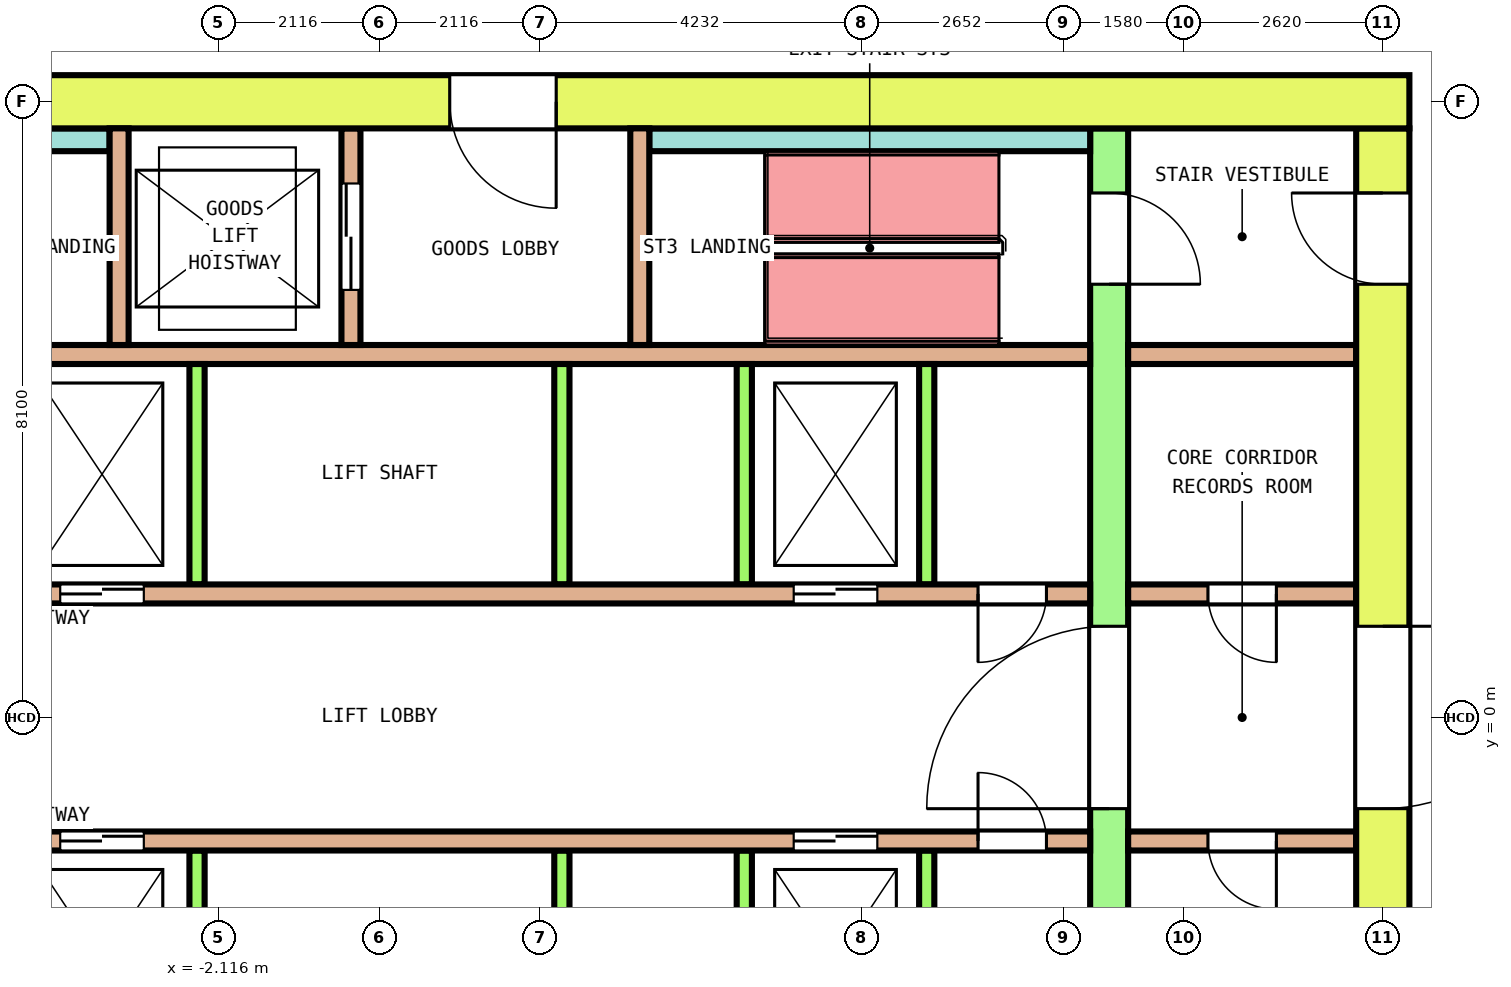
"""IFC4 building model, lengths in metres.
Left out: names, types, materials, properties, quantities, classifications, styles, units other than length and angle.
Written with IfcOpenShell. Run it as: python <this file> out.ifc"""

import sys

from ifc_helpers import new_model, si_unit, direction, frame, frame_2d, origin, place, context, subcontext, project, spatial, rectangle, extrude, element, fill, save


model = new_model("IFC4")
c1 = context("Model", 3, precision=1e-05, world=origin(), true_north=direction((0.0, 1.0)))
c2 = subcontext(c1, "Body", "Model", "MODEL_VIEW")
j1 = project(units=[si_unit("LENGTHUNIT", "METRE"), si_unit("PLANEANGLEUNIT", "RADIAN")], contexts=[c1])
p1 = place(None, origin())
s1 = spatial("IfcSite", under=j1, at=p1, CompositionType="ELEMENT")
p2 = place(p1, origin())
s2 = spatial("IfcBuilding", under=s1, at=p2, CompositionType="ELEMENT")
p3 = place(p2, frame((0.0, 0.0, 171.6)))
s3 = spatial("IfcBuildingStorey", under=s2, at=p3, CompositionType="ELEMENT", Elevation=171.6)
p4 = place(p3, frame((-13.55, 8.1, 0.0), z_axis=(0.0, 0.0, 1.0), x_axis=(1.0, 0.0, 0.0)))
e1 = element("IfcWall", 1, at=p4, inside=s3, PredefinedType="SHEAR", context=c2, shape_type="SweptSolid", body=[
    extrude(rectangle(XDim=27.1, YDim=0.7, at=frame_2d((13.55, 0.0))), origin(), (0.0, 0.0, 1.0), 4.1),
])
p5 = place(p4, frame((14.475, 0.0, 0.0)))
e2 = element("IfcOpeningElement", 2, at=p5, cuts=e1, PredefinedType="OPENING", context=c2, shape_type="SweptSolid", body=[
    extrude(rectangle(XDim=1.4, YDim=2.1, at=frame_2d((0.7, 1.05))), frame((0.0, 0.36, 0.0), z_axis=(0.0, -1.0, 0.0), x_axis=(1.0, 0.0, 0.0)), (0.0, 0.0, 1.0), 0.72),
])
p6 = place(p3, frame((13.2, -7.75, 0.0), z_axis=(0.0, 0.0, 1.0), x_axis=(0.0, 1.0, 0.0)))
e3 = element("IfcWall", 3, at=p6, inside=s3, PredefinedType="SHEAR", context=c2, shape_type="SweptSolid", body=[
    extrude(rectangle(XDim=15.5, YDim=0.7, at=frame_2d((7.75, 0.0))), origin(), (0.0, 0.0, 1.0), 4.1),
])
p7 = place(p6, frame((6.55, 0.0, 0.0)))
e4 = element("IfcOpeningElement", 4, at=p7, cuts=e3, PredefinedType="OPENING", context=c2, shape_type="SweptSolid", body=[
    extrude(rectangle(XDim=2.4, YDim=2.1, at=frame_2d((1.2, 1.05))), frame((0.0, 0.36, 0.0), z_axis=(0.0, -1.0, 0.0), x_axis=(1.0, 0.0, 0.0)), (0.0, 0.0, 1.0), 0.72),
])
p8 = place(p6, frame((13.45, 0.0, 0.0)))
e5 = element("IfcOpeningElement", 5, at=p8, cuts=e3, PredefinedType="OPENING", context=c2, shape_type="SweptSolid", body=[
    extrude(rectangle(XDim=1.2, YDim=2.1, at=frame_2d((0.6, 1.05))), frame((0.0, 0.36, 0.0), z_axis=(0.0, -1.0, 0.0), x_axis=(1.0, 0.0, 0.0)), (0.0, 0.0, 1.0), 0.72),
])
p9 = place(p6, frame((0.95, 0.0, 0.0)))
e6 = element("IfcOpeningElement", 6, at=p9, cuts=e3, PredefinedType="OPENING", context=c2, shape_type="SweptSolid", body=[
    extrude(rectangle(XDim=1.0, YDim=2.1, at=frame_2d((0.5, 1.05))), frame((0.0, 0.36, 0.0), z_axis=(0.0, -1.0, 0.0), x_axis=(1.0, 0.0, 0.0)), (0.0, 0.0, 1.0), 0.72),
])
p10 = place(p3, frame((9.6, -7.75, 0.0), z_axis=(0.0, 0.0, 1.0), x_axis=(0.0, 1.0, 0.0)))
e7 = element("IfcWall", 7, at=p10, inside=s3, PredefinedType="SHEAR", context=c2, shape_type="SweptSolid", body=[
    extrude(rectangle(XDim=15.5, YDim=0.5, at=frame_2d((7.75, 0.0))), origin(), (0.0, 0.0, 1.0), 4.1),
])
p11 = place(p10, frame((6.55, 0.0, 0.0)))
e8 = element("IfcOpeningElement", 8, at=p11, cuts=e7, PredefinedType="OPENING", context=c2, shape_type="SweptSolid", body=[
    extrude(rectangle(XDim=2.4, YDim=2.1, at=frame_2d((1.2, 1.05))), frame((0.0, 0.26, 0.0), z_axis=(0.0, -1.0, 0.0), x_axis=(1.0, 0.0, 0.0)), (0.0, 0.0, 1.0), 0.52),
])
p12 = place(p10, frame((13.45, 0.0, 0.0)))
e9 = element("IfcOpeningElement", 9, at=p12, cuts=e7, PredefinedType="OPENING", context=c2, shape_type="SweptSolid", body=[
    extrude(rectangle(XDim=1.2, YDim=2.1, at=frame_2d((0.6, 1.05))), frame((0.0, 0.26, 0.0), z_axis=(0.0, -1.0, 0.0), x_axis=(1.0, 0.0, 0.0)), (0.0, 0.0, 1.0), 0.52),
])
p13 = place(p10, frame((0.95, 0.0, 0.0)))
e10 = element("IfcOpeningElement", 10, at=p13, cuts=e7, PredefinedType="OPENING", context=c2, shape_type="SweptSolid", body=[
    extrude(rectangle(XDim=1.0, YDim=2.1, at=frame_2d((0.5, 1.05))), frame((0.0, 0.26, 0.0), z_axis=(0.0, -1.0, 0.0), x_axis=(1.0, 0.0, 0.0)), (0.0, 0.0, 1.0), 0.52),
])
p14 = place(p3, frame((-9.35, 1.625, 0.0), z_axis=(0.0, 0.0, 1.0), x_axis=(1.0, 0.0, 0.0)))
e11 = element("IfcWall", 11, at=p14, inside=s3, PredefinedType="SOLIDWALL", context=c2, shape_type="SweptSolid", body=[
    extrude(rectangle(XDim=18.7, YDim=0.25, at=frame_2d((9.35, 0.0))), origin(), (0.0, 0.0, 1.0), 4.1),
])
p15 = place(p14, frame((2.85, 0.0, 0.0)))
e12 = element("IfcOpeningElement", 12, at=p15, cuts=e11, PredefinedType="OPENING", context=c2, shape_type="SweptSolid", body=[
    extrude(rectangle(XDim=1.1, YDim=2.1, at=frame_2d((0.55, 1.05))), frame((0.0, 0.135, 0.0), z_axis=(0.0, -1.0, 0.0), x_axis=(1.0, 0.0, 0.0)), (0.0, 0.0, 1.0), 0.27),
])
p16 = place(p14, frame((5.15, 0.0, 0.0)))
e13 = element("IfcOpeningElement", 13, at=p16, cuts=e11, PredefinedType="OPENING", context=c2, shape_type="SweptSolid", body=[
    extrude(rectangle(XDim=1.1, YDim=2.1, at=frame_2d((0.55, 1.05))), frame((0.0, 0.135, 0.0), z_axis=(0.0, -1.0, 0.0), x_axis=(1.0, 0.0, 0.0)), (0.0, 0.0, 1.0), 0.27),
])
p17 = place(p14, frame((14.8, 0.0, 0.0)))
e14 = element("IfcOpeningElement", 14, at=p17, cuts=e11, PredefinedType="OPENING", context=c2, shape_type="SweptSolid", body=[
    extrude(rectangle(XDim=1.1, YDim=2.1, at=frame_2d((0.55, 1.05))), frame((0.0, 0.135, 0.0), z_axis=(0.0, -1.0, 0.0), x_axis=(1.0, 0.0, 0.0)), (0.0, 0.0, 1.0), 0.27),
])
p18 = place(p14, frame((0.575, 0.0, 0.0)))
e15 = element("IfcOpeningElement", 15, at=p18, cuts=e11, PredefinedType="OPENING", context=c2, shape_type="SweptSolid", body=[
    extrude(rectangle(XDim=0.9, YDim=2.1, at=frame_2d((0.45, 1.05))), frame((0.0, 0.135, 0.0), z_axis=(0.0, -1.0, 0.0), x_axis=(1.0, 0.0, 0.0)), (0.0, 0.0, 1.0), 0.27),
])
p19 = place(p14, frame((17.225, 0.0, 0.0)))
e16 = element("IfcOpeningElement", 16, at=p19, cuts=e11, PredefinedType="OPENING", context=c2, shape_type="SweptSolid", body=[
    extrude(rectangle(XDim=0.9, YDim=2.1, at=frame_2d((0.45, 1.05))), frame((0.0, 0.135, 0.0), z_axis=(0.0, -1.0, 0.0), x_axis=(1.0, 0.0, 0.0)), (0.0, 0.0, 1.0), 0.27),
])
p20 = place(p3, frame((9.85, 1.625, 0.0), z_axis=(0.0, 0.0, 1.0), x_axis=(1.0, 0.0, 0.0)))
e17 = element("IfcWall", 17, at=p20, inside=s3, PredefinedType="SOLIDWALL", context=c2, shape_type="SweptSolid", body=[
    extrude(rectangle(XDim=3.0, YDim=0.25, at=frame_2d((1.5, 0.0))), origin(), (0.0, 0.0, 1.0), 4.1),
])
p21 = place(p20, frame((1.05, 0.0, 0.0)))
e18 = element("IfcOpeningElement", 18, at=p21, cuts=e17, PredefinedType="OPENING", context=c2, shape_type="SweptSolid", body=[
    extrude(rectangle(XDim=0.9, YDim=2.1, at=frame_2d((0.45, 1.05))), frame((0.0, 0.135, 0.0), z_axis=(0.0, -1.0, 0.0), x_axis=(1.0, 0.0, 0.0)), (0.0, 0.0, 1.0), 0.27),
])
p22 = place(p3, frame((-9.35, 4.775, 0.0), z_axis=(0.0, 0.0, 1.0), x_axis=(1.0, 0.0, 0.0)))
e19 = element("IfcWall", 19, at=p22, inside=s3, PredefinedType="SOLIDWALL", context=c2, shape_type="SweptSolid", body=[
    extrude(rectangle(XDim=18.7, YDim=0.25, at=frame_2d((9.35, 0.0))), origin(), (0.0, 0.0, 1.0), 4.1),
])
p23 = place(p3, frame((9.85, 4.775, 0.0), z_axis=(0.0, 0.0, 1.0), x_axis=(1.0, 0.0, 0.0)))
e20 = element("IfcWall", 20, at=p23, inside=s3, PredefinedType="SOLIDWALL", context=c2, shape_type="SweptSolid", body=[
    extrude(rectangle(XDim=3.0, YDim=0.25, at=frame_2d((1.5, 0.0))), origin(), (0.0, 0.0, 1.0), 4.1),
])
for number, where, z_axis, x_axis in (
    (21, (-2.4, 1.75, 0.0), (0.0, 0.0, 1.0), (0.0, 1.0, 0.0)),
    (22, (2.4, 1.75, 0.0), (0.0, 0.0, 1.0), (0.0, 1.0, 0.0)),
    (23, (4.8, 1.75, 0.0), (0.0, 0.0, 1.0), (0.0, 1.0, 0.0)),
    (24, (7.2, 1.75, 0.0), (0.0, 0.0, 1.0), (0.0, 1.0, 0.0)),
):
    element("IfcWall", number, at=place(p3, frame(where, z_axis=z_axis, x_axis=x_axis)), inside=s3, PredefinedType="SOLIDWALL", context=c2, shape_type="SweptSolid", body=[
        extrude(rectangle(XDim=2.9, YDim=0.2, at=frame_2d((1.45, 0.0))), origin(), (0.0, 0.0, 1.0), 4.1),
    ])
p24 = place(p3, frame((-9.35, -1.625, 0.0), z_axis=(0.0, 0.0, 1.0), x_axis=(1.0, 0.0, 0.0)))
e25 = element("IfcWall", 25, at=p24, inside=s3, PredefinedType="SOLIDWALL", context=c2, shape_type="SweptSolid", body=[
    extrude(rectangle(XDim=18.7, YDim=0.25, at=frame_2d((9.35, 0.0))), origin(), (0.0, 0.0, 1.0), 4.1),
])
p25 = place(p24, frame((2.85, 0.0, 0.0)))
e26 = element("IfcOpeningElement", 26, at=p25, cuts=e25, PredefinedType="OPENING", context=c2, shape_type="SweptSolid", body=[
    extrude(rectangle(XDim=1.1, YDim=2.1, at=frame_2d((0.55, 1.05))), frame((0.0, 0.135, 0.0), z_axis=(0.0, -1.0, 0.0), x_axis=(1.0, 0.0, 0.0)), (0.0, 0.0, 1.0), 0.27),
])
p26 = place(p24, frame((5.15, 0.0, 0.0)))
e27 = element("IfcOpeningElement", 27, at=p26, cuts=e25, PredefinedType="OPENING", context=c2, shape_type="SweptSolid", body=[
    extrude(rectangle(XDim=1.1, YDim=2.1, at=frame_2d((0.55, 1.05))), frame((0.0, 0.135, 0.0), z_axis=(0.0, -1.0, 0.0), x_axis=(1.0, 0.0, 0.0)), (0.0, 0.0, 1.0), 0.27),
])
p27 = place(p24, frame((14.8, 0.0, 0.0)))
e28 = element("IfcOpeningElement", 28, at=p27, cuts=e25, PredefinedType="OPENING", context=c2, shape_type="SweptSolid", body=[
    extrude(rectangle(XDim=1.1, YDim=2.1, at=frame_2d((0.55, 1.05))), frame((0.0, 0.135, 0.0), z_axis=(0.0, -1.0, 0.0), x_axis=(1.0, 0.0, 0.0)), (0.0, 0.0, 1.0), 0.27),
])
p28 = place(p24, frame((0.575, 0.0, 0.0)))
e29 = element("IfcOpeningElement", 29, at=p28, cuts=e25, PredefinedType="OPENING", context=c2, shape_type="SweptSolid", body=[
    extrude(rectangle(XDim=0.9, YDim=2.1, at=frame_2d((0.45, 1.05))), frame((0.0, 0.135, 0.0), z_axis=(0.0, -1.0, 0.0), x_axis=(1.0, 0.0, 0.0)), (0.0, 0.0, 1.0), 0.27),
])
p29 = place(p24, frame((17.225, 0.0, 0.0)))
e30 = element("IfcOpeningElement", 30, at=p29, cuts=e25, PredefinedType="OPENING", context=c2, shape_type="SweptSolid", body=[
    extrude(rectangle(XDim=0.9, YDim=2.1, at=frame_2d((0.45, 1.05))), frame((0.0, 0.135, 0.0), z_axis=(0.0, -1.0, 0.0), x_axis=(1.0, 0.0, 0.0)), (0.0, 0.0, 1.0), 0.27),
])
p30 = place(p3, frame((9.85, -1.625, 0.0), z_axis=(0.0, 0.0, 1.0), x_axis=(1.0, 0.0, 0.0)))
e31 = element("IfcWall", 31, at=p30, inside=s3, PredefinedType="SOLIDWALL", context=c2, shape_type="SweptSolid", body=[
    extrude(rectangle(XDim=3.0, YDim=0.25, at=frame_2d((1.5, 0.0))), origin(), (0.0, 0.0, 1.0), 4.1),
])
p31 = place(p30, frame((1.05, 0.0, 0.0)))
e32 = element("IfcOpeningElement", 32, at=p31, cuts=e31, PredefinedType="OPENING", context=c2, shape_type="SweptSolid", body=[
    extrude(rectangle(XDim=0.9, YDim=2.1, at=frame_2d((0.45, 1.05))), frame((0.0, 0.135, 0.0), z_axis=(0.0, -1.0, 0.0), x_axis=(1.0, 0.0, 0.0)), (0.0, 0.0, 1.0), 0.27),
])
for number, where, z_axis, x_axis in (
    (33, (-2.4, -4.65, 0.0), (0.0, 0.0, 1.0), (0.0, 1.0, 0.0)),
    (34, (2.4, -4.65, 0.0), (0.0, 0.0, 1.0), (0.0, 1.0, 0.0)),
    (35, (4.8, -4.65, 0.0), (0.0, 0.0, 1.0), (0.0, 1.0, 0.0)),
    (36, (7.2, -4.65, 0.0), (0.0, 0.0, 1.0), (0.0, 1.0, 0.0)),
):
    element("IfcWall", number, at=place(p3, frame(where, z_axis=z_axis, x_axis=x_axis)), inside=s3, PredefinedType="SOLIDWALL", context=c2, shape_type="SweptSolid", body=[
        extrude(rectangle(XDim=2.9, YDim=0.2, at=frame_2d((1.45, 0.0))), origin(), (0.0, 0.0, 1.0), 4.1),
    ])
for number, where, z_axis, x_axis in (
    (37, (-9.35, 7.6, 0.0), (0.0, 0.0, 1.0), (1.0, 0.0, 0.0)),
    (38, (3.55, 7.6, 0.0), (0.0, 0.0, 1.0), (1.0, 0.0, 0.0)),
):
    element("IfcWall", number, at=place(p3, frame(where, z_axis=z_axis, x_axis=x_axis)), inside=s3, PredefinedType="SOLIDWALL", context=c2, shape_type="SweptSolid", body=[
        extrude(rectangle(XDim=5.8, YDim=0.3, at=frame_2d((2.9, 0.0))), origin(), (0.0, 0.0, 1.0), 4.1),
    ])
p32 = place(p3, frame((-3.425, 4.9, 0.0), z_axis=(0.0, 0.0, 1.0), x_axis=(0.0, 1.0, 0.0)))
e39 = element("IfcWall", 39, at=p32, inside=s3, PredefinedType="SOLIDWALL", context=c2, shape_type="SweptSolid", body=[
    extrude(rectangle(XDim=2.85, YDim=0.25, at=frame_2d((1.425, 0.0))), origin(), (0.0, 0.0, 1.0), 4.1),
])
p33 = place(p3, frame((-0.375, 4.9, 0.0), z_axis=(0.0, 0.0, 1.0), x_axis=(0.0, 1.0, 0.0)))
e40 = element("IfcWall", 40, at=p33, inside=s3, PredefinedType="SOLIDWALL", context=c2, shape_type="SweptSolid", body=[
    extrude(rectangle(XDim=2.85, YDim=0.25, at=frame_2d((1.425, 0.0))), origin(), (0.0, 0.0, 1.0), 4.1),
])
p34 = place(p33, frame((0.725, 0.0, 0.0)))
e41 = element("IfcOpeningElement", 41, at=p34, cuts=e40, PredefinedType="OPENING", context=c2, shape_type="SweptSolid", body=[
    extrude(rectangle(XDim=1.4, YDim=2.1, at=frame_2d((0.7, 1.05))), frame((0.0, 0.135, 0.0), z_axis=(0.0, -1.0, 0.0), x_axis=(1.0, 0.0, 0.0)), (0.0, 0.0, 1.0), 0.27),
])
p35 = place(p3, frame((3.425, 4.9, 0.0), z_axis=(0.0, 0.0, 1.0), x_axis=(0.0, 1.0, 0.0)))
e42 = element("IfcWall", 42, at=p35, inside=s3, PredefinedType="SOLIDWALL", context=c2, shape_type="SweptSolid", body=[
    extrude(rectangle(XDim=2.85, YDim=0.25, at=frame_2d((1.425, 0.0))), origin(), (0.0, 0.0, 1.0), 4.1),
])
p36 = place(p16, origin())
e43 = element("IfcDoor", 43, at=p36, inside=s3, OperationType="DOUBLE_DOOR_SLIDING", PredefinedType="DOOR", context=c2, shape_type="SweptSolid", body=[
    extrude(rectangle(XDim=1.1, YDim=2.1, at=frame_2d((0.55, 1.05))), frame((0.0, 0.075, 0.0), z_axis=(0.0, -1.0, 0.0), x_axis=(1.0, 0.0, 0.0)), (0.0, 0.0, 1.0), 0.15),
])
fill(e13, e43)
p37 = place(p17, origin())
e44 = element("IfcDoor", 44, at=p37, inside=s3, OperationType="DOUBLE_DOOR_SLIDING", PredefinedType="DOOR", context=c2, shape_type="SweptSolid", body=[
    extrude(rectangle(XDim=1.1, YDim=2.1, at=frame_2d((0.55, 1.05))), frame((0.0, 0.075, 0.0), z_axis=(0.0, -1.0, 0.0), x_axis=(1.0, 0.0, 0.0)), (0.0, 0.0, 1.0), 0.15),
])
fill(e14, e44)
p38 = place(p26, origin())
e45 = element("IfcDoor", 45, at=p38, inside=s3, OperationType="DOUBLE_DOOR_SLIDING", PredefinedType="DOOR", context=c2, shape_type="SweptSolid", body=[
    extrude(rectangle(XDim=1.1, YDim=2.1, at=frame_2d((0.55, 1.05))), frame((0.0, 0.075, 0.0), z_axis=(0.0, -1.0, 0.0), x_axis=(1.0, 0.0, 0.0)), (0.0, 0.0, 1.0), 0.15),
])
fill(e27, e45)
p39 = place(p27, origin())
e46 = element("IfcDoor", 46, at=p39, inside=s3, OperationType="DOUBLE_DOOR_SLIDING", PredefinedType="DOOR", context=c2, shape_type="SweptSolid", body=[
    extrude(rectangle(XDim=1.1, YDim=2.1, at=frame_2d((0.55, 1.05))), frame((0.0, 0.075, 0.0), z_axis=(0.0, -1.0, 0.0), x_axis=(1.0, 0.0, 0.0)), (0.0, 0.0, 1.0), 0.15),
])
fill(e28, e46)
p40 = place(p34, origin())
e47 = element("IfcDoor", 47, at=p40, inside=s3, OperationType="DOUBLE_DOOR_SLIDING", PredefinedType="DOOR", context=c2, shape_type="SweptSolid", body=[
    extrude(rectangle(XDim=1.4, YDim=2.1, at=frame_2d((0.7, 1.05))), frame((0.0, 0.075, 0.0), z_axis=(0.0, -1.0, 0.0), x_axis=(1.0, 0.0, 0.0)), (0.0, 0.0, 1.0), 0.15),
])
fill(e41, e47)
p41 = place(p11, origin())
e48 = element("IfcDoor", 48, at=p41, inside=s3, OperationType="DOUBLE_DOOR_SINGLE_SWING", PredefinedType="DOOR", context=c2, shape_type="SweptSolid", body=[
    extrude(rectangle(XDim=2.4, YDim=2.1, at=frame_2d((1.2, 1.05))), frame((0.0, 0.2, 0.0), z_axis=(0.0, -1.0, 0.0), x_axis=(1.0, 0.0, 0.0)), (0.0, 0.0, 1.0), 0.4),
])
fill(e8, e48)
p42 = place(p7, origin())
e49 = element("IfcDoor", 49, at=p42, inside=s3, OperationType="DOUBLE_DOOR_SINGLE_SWING", PredefinedType="DOOR", context=c2, shape_type="SweptSolid", body=[
    extrude(rectangle(XDim=2.4, YDim=2.1, at=frame_2d((1.2, 1.05))), frame((0.0, 0.3, 0.0), z_axis=(0.0, -1.0, 0.0), x_axis=(1.0, 0.0, 0.0)), (0.0, 0.0, 1.0), 0.6),
])
fill(e4, e49)
p43 = place(p12, origin())
e50 = element("IfcDoor", 50, at=p43, inside=s3, OperationType="SINGLE_SWING_LEFT", PredefinedType="DOOR", context=c2, shape_type="SweptSolid", body=[
    extrude(rectangle(XDim=1.2, YDim=2.1, at=frame_2d((0.6, 1.05))), frame((0.0, 0.2, 0.0), z_axis=(0.0, -1.0, 0.0), x_axis=(1.0, 0.0, 0.0)), (0.0, 0.0, 1.0), 0.4),
])
fill(e9, e50)
p44 = place(p8, origin())
e51 = element("IfcDoor", 51, at=p44, inside=s3, OperationType="SINGLE_SWING_RIGHT", PredefinedType="DOOR", context=c2, shape_type="SweptSolid", body=[
    extrude(rectangle(XDim=1.2, YDim=2.1, at=frame_2d((0.6, 1.05))), frame((0.0, 0.3, 0.0), z_axis=(0.0, -1.0, 0.0), x_axis=(1.0, 0.0, 0.0)), (0.0, 0.0, 1.0), 0.6),
])
fill(e5, e51)
p45 = place(p5, origin())
e52 = element("IfcDoor", 52, at=p45, inside=s3, OperationType="DOUBLE_DOOR_SINGLE_SWING", PredefinedType="DOOR", context=c2, shape_type="SweptSolid", body=[
    extrude(rectangle(XDim=1.4, YDim=2.1, at=frame_2d((0.7, 1.05))), frame((0.0, 0.3, 0.0), z_axis=(0.0, -1.0, 0.0), x_axis=(1.0, 0.0, 0.0)), (0.0, 0.0, 1.0), 0.6),
])
fill(e2, e52)
p46 = place(p19, origin())
e53 = element("IfcDoor", 53, at=p46, inside=s3, OperationType="SINGLE_SWING_LEFT", PredefinedType="DOOR", context=c2, shape_type="SweptSolid", body=[
    extrude(rectangle(XDim=0.9, YDim=2.1, at=frame_2d((0.45, 1.05))), frame((0.0, 0.075, 0.0), z_axis=(0.0, -1.0, 0.0), x_axis=(1.0, 0.0, 0.0)), (0.0, 0.0, 1.0), 0.15),
])
fill(e16, e53)
p47 = place(p21, origin())
e54 = element("IfcDoor", 54, at=p47, inside=s3, OperationType="SINGLE_SWING_RIGHT", PredefinedType="DOOR", context=c2, shape_type="SweptSolid", body=[
    extrude(rectangle(XDim=0.9, YDim=2.1, at=frame_2d((0.45, 1.05))), frame((0.0, 0.075, 0.0), z_axis=(0.0, -1.0, 0.0), x_axis=(1.0, 0.0, 0.0)), (0.0, 0.0, 1.0), 0.15),
])
fill(e18, e54)
p48 = place(p29, origin())
e55 = element("IfcDoor", 55, at=p48, inside=s3, OperationType="SINGLE_SWING_LEFT", PredefinedType="DOOR", context=c2, shape_type="SweptSolid", body=[
    extrude(rectangle(XDim=0.9, YDim=2.1, at=frame_2d((0.45, 1.05))), frame((0.0, 0.075, 0.0), z_axis=(0.0, -1.0, 0.0), x_axis=(1.0, 0.0, 0.0)), (0.0, 0.0, 1.0), 0.15),
])
fill(e30, e55)
p49 = place(p31, origin())
e56 = element("IfcDoor", 56, at=p49, inside=s3, OperationType="SINGLE_SWING_RIGHT", PredefinedType="DOOR", context=c2, shape_type="SweptSolid", body=[
    extrude(rectangle(XDim=0.9, YDim=2.1, at=frame_2d((0.45, 1.05))), frame((0.0, 0.075, 0.0), z_axis=(0.0, -1.0, 0.0), x_axis=(1.0, 0.0, 0.0)), (0.0, 0.0, 1.0), 0.15),
])
fill(e32, e56)
save(model, sys.argv[1])
